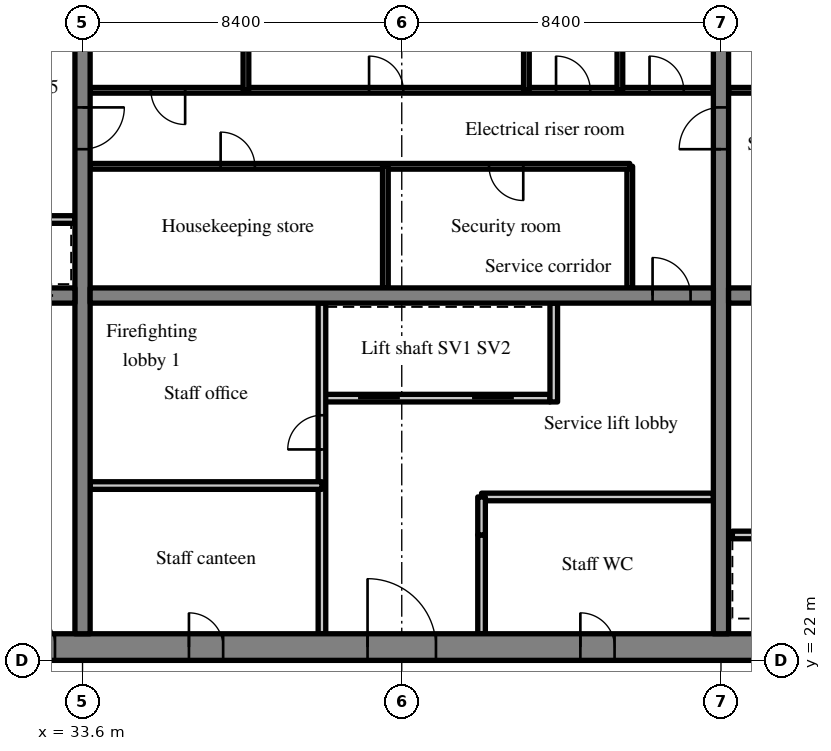
"""IFC4 building model, lengths in metres.
Left out: names, types, materials, properties, quantities, classifications, styles, units other than length and angle.
Written with IfcOpenShell. Run it as: python <this file> out.ifc"""

import sys

from ifc_helpers import new_model, si_unit, direction, frame, frame_2d, origin, place, context, subcontext, project, spatial, rectangle, extrude, source, transform, mapped, element, fill, save


model = new_model("IFC4")
c1 = context("Model", 3, precision=1e-05, world=origin(), true_north=direction((0.0, 1.0)))
c2 = subcontext(c1, "Body", "Model", "MODEL_VIEW")
j1 = project(units=[si_unit("LENGTHUNIT", "METRE"), si_unit("PLANEANGLEUNIT", "RADIAN")], contexts=[c1])
p1 = place(None, origin())
s1 = spatial("IfcSite", under=j1, at=p1, CompositionType="ELEMENT")
p2 = place(p1, origin())
s2 = spatial("IfcBuilding", under=s1, at=p2, CompositionType="ELEMENT")
p3 = place(p2, frame((0.0, 0.0, 178.2)))
s3 = spatial("IfcBuildingStorey", under=s2, at=p3, CompositionType="ELEMENT", Elevation=178.2)
m1 = source(origin(), c2, "Body", "SweptSolid", [
    extrude(rectangle(XDim=50.4, YDim=0.7, at=frame_2d((25.2, 0.0))), origin(), (0.0, 0.0, 1.0), 3.52),
])
p4 = place(p3, frame((25.2, 22.35, 0.0), z_axis=(0.0, 0.0, 1.0), x_axis=(1.0, 0.0, 0.0)))
e1 = element("IfcWall", 1, at=p4, inside=s3, PredefinedType="SHEAR", context=c2, shape_type="MappedRepresentation", body=[
    mapped(m1, transform((0.0, 0.0, 0.0), scale=1.0)),
])
m2 = source(origin(), c2, "Body", "SweptSolid", [
    extrude(rectangle(XDim=1.8, YDim=2.1, at=frame_2d((0.9, 1.05))), frame((0.0, 0.36, 0.0), z_axis=(0.0, -1.0, 0.0), x_axis=(1.0, 0.0, 0.0)), (0.0, 0.0, 1.0), 0.72),
])
p5 = place(p4, frame((15.9, 0.0, 0.0)))
e2 = element("IfcOpeningElement", 2, at=p5, cuts=e1, PredefinedType="OPENING", context=c2, shape_type="MappedRepresentation", body=[
    mapped(m2, transform((0.0, 0.0, 0.0), scale=1.0)),
])
m3 = source(origin(), c2, "Body", "SweptSolid", [
    extrude(rectangle(XDim=0.9, YDim=2.1, at=frame_2d((0.45, 1.05))), frame((0.0, 0.36, 0.0), z_axis=(0.0, -1.0, 0.0), x_axis=(1.0, 0.0, 0.0)), (0.0, 0.0, 1.0), 0.72),
])
p6 = place(p4, frame((11.2, 0.0, 0.0)))
e3 = element("IfcOpeningElement", 3, at=p6, cuts=e1, PredefinedType="OPENING", context=c2, shape_type="MappedRepresentation", body=[
    mapped(m3, transform((0.0, 0.0, 0.0), scale=1.0)),
])
p7 = place(p4, frame((21.5, 0.0, 0.0)))
e4 = element("IfcOpeningElement", 4, at=p7, cuts=e1, PredefinedType="OPENING", context=c2, shape_type="MappedRepresentation", body=[
    mapped(m3, transform((0.0, 0.0, 0.0), scale=1.0)),
])
p8 = place(p4, frame((32.7, 0.0, 0.0)))
e5 = element("IfcOpeningElement", 5, at=p8, cuts=e1, PredefinedType="OPENING", context=c2, shape_type="MappedRepresentation", body=[
    mapped(m2, transform((0.0, 0.0, 0.0), scale=1.0)),
])
m4 = source(origin(), c2, "Body", "SweptSolid", [
    extrude(rectangle(XDim=1.2, YDim=2.1, at=frame_2d((0.6, 1.05))), frame((0.0, 0.36, 0.0), z_axis=(0.0, -1.0, 0.0), x_axis=(1.0, 0.0, 0.0)), (0.0, 0.0, 1.0), 0.72),
])
p9 = place(p4, frame((6.475, 0.0, 0.0)))
e6 = element("IfcOpeningElement", 6, at=p9, cuts=e1, PredefinedType="OPENING", context=c2, shape_type="MappedRepresentation", body=[
    mapped(m4, transform((0.0, 0.0, 0.0), scale=1.0)),
])
p10 = place(p4, frame((47.875, 0.0, 0.0)))
e7 = element("IfcOpeningElement", 7, at=p10, cuts=e1, PredefinedType="OPENING", context=c2, shape_type="MappedRepresentation", body=[
    mapped(m4, transform((0.0, 0.0, 0.0), scale=1.0)),
])
m5 = source(origin(), c2, "Body", "SweptSolid", [
    extrude(rectangle(XDim=18.6, YDim=0.4, at=frame_2d((9.3, 0.0))), origin(), (0.0, 0.0, 1.0), 3.52),
])
p11 = place(p3, frame((33.6, 22.7, 0.0), z_axis=(0.0, 0.0, 1.0), x_axis=(0.0, 1.0, 0.0)))
e8 = element("IfcWall", 8, at=p11, inside=s3, PredefinedType="SHEAR", context=c2, shape_type="MappedRepresentation", body=[
    mapped(m5, transform((0.0, 0.0, 0.0), scale=1.0)),
])
m6 = source(origin(), c2, "Body", "SweptSolid", [
    extrude(rectangle(XDim=1.1, YDim=2.1, at=frame_2d((0.55, 1.05))), frame((0.0, 0.21, 0.0), z_axis=(0.0, -1.0, 0.0), x_axis=(1.0, 0.0, 0.0)), (0.0, 0.0, 1.0), 0.42),
])
p12 = place(p11, frame((12.75, 0.0, 0.0)))
e9 = element("IfcOpeningElement", 9, at=p12, cuts=e8, PredefinedType="OPENING", context=c2, shape_type="MappedRepresentation", body=[
    mapped(m6, transform((0.0, 0.0, 0.0), scale=1.0)),
])
p13 = place(p3, frame((50.4, 22.7, 0.0), z_axis=(0.0, 0.0, 1.0), x_axis=(0.0, 1.0, 0.0)))
e10 = element("IfcWall", 10, at=p13, inside=s3, PredefinedType="SHEAR", context=c2, shape_type="MappedRepresentation", body=[
    mapped(m5, transform((0.0, 0.0, 0.0), scale=1.0)),
])
p14 = place(p13, frame((12.75, 0.0, 0.0)))
e11 = element("IfcOpeningElement", 11, at=p14, cuts=e10, PredefinedType="OPENING", context=c2, shape_type="MappedRepresentation", body=[
    mapped(m6, transform((0.0, 0.0, 0.0), scale=1.0)),
])
m7 = source(origin(), c2, "Body", "SweptSolid", [
    extrude(rectangle(XDim=7.5, YDim=0.4, at=frame_2d((3.75, 0.0))), origin(), (0.0, 0.0, 1.0), 3.52),
])
p15 = place(p3, frame((25.9, 31.6, 0.0), z_axis=(0.0, 0.0, 1.0), x_axis=(1.0, 0.0, 0.0)))
e12 = element("IfcWall", 12, at=p15, inside=s3, PredefinedType="SHEAR", context=c2, shape_type="MappedRepresentation", body=[
    mapped(m7, transform((0.0, 0.0, 0.0), scale=1.0)),
])
p16 = place(p15, frame((5.825, 0.0, 0.0)))
e13 = element("IfcOpeningElement", 13, at=p16, cuts=e12, PredefinedType="OPENING", context=c2, shape_type="MappedRepresentation", body=[
    mapped(m6, transform((0.0, 0.0, 0.0), scale=1.0)),
])
m8 = source(origin(), c2, "Body", "SweptSolid", [
    extrude(rectangle(XDim=16.4, YDim=0.4, at=frame_2d((8.2, 0.0))), origin(), (0.0, 0.0, 1.0), 3.52),
])
p17 = place(p3, frame((33.8, 31.6, 0.0), z_axis=(0.0, 0.0, 1.0), x_axis=(1.0, 0.0, 0.0)))
e14 = element("IfcWall", 14, at=p17, inside=s3, PredefinedType="SHEAR", context=c2, shape_type="MappedRepresentation", body=[
    mapped(m8, transform((0.0, 0.0, 0.0), scale=1.0)),
])
m9 = source(origin(), c2, "Body", "SweptSolid", [
    extrude(rectangle(XDim=1.0, YDim=2.1, at=frame_2d((0.5, 1.05))), frame((0.0, 0.21, 0.0), z_axis=(0.0, -1.0, 0.0), x_axis=(1.0, 0.0, 0.0)), (0.0, 0.0, 1.0), 0.42),
])
p18 = place(p17, frame((14.8, 0.0, 0.0)))
e15 = element("IfcOpeningElement", 15, at=p18, cuts=e14, PredefinedType="OPENING", context=c2, shape_type="MappedRepresentation", body=[
    mapped(m9, transform((0.0, 0.0, 0.0), scale=1.0)),
])
p19 = place(p3, frame((50.6, 31.6, 0.0), z_axis=(0.0, 0.0, 1.0), x_axis=(1.0, 0.0, 0.0)))
e16 = element("IfcWall", 16, at=p19, inside=s3, PredefinedType="SHEAR", context=c2, shape_type="MappedRepresentation", body=[
    mapped(m8, transform((0.0, 0.0, 0.0), scale=1.0)),
])
p20 = place(p19, frame((0.6, 0.0, 0.0)))
e17 = element("IfcOpeningElement", 17, at=p20, cuts=e16, PredefinedType="OPENING", context=c2, shape_type="MappedRepresentation", body=[
    mapped(m9, transform((0.0, 0.0, 0.0), scale=1.0)),
])
m10 = source(origin(), c2, "Body", "SweptSolid", [
    extrude(rectangle(XDim=6.0, YDim=0.2, at=frame_2d((3.0, 0.0))), origin(), (0.0, 0.0, 1.0), 3.52),
])
p21 = place(p3, frame((39.9, 28.9, 0.0), z_axis=(0.0, 0.0, 1.0), x_axis=(1.0, 0.0, 0.0)))
e18 = element("IfcWall", 18, at=p21, inside=s3, PredefinedType="SOLIDWALL", context=c2, shape_type="MappedRepresentation", body=[
    mapped(m10, transform((0.0, 0.0, 0.0), scale=1.0)),
])
m11 = source(origin(), c2, "Body", "SweptSolid", [
    extrude(rectangle(XDim=1.1, YDim=2.1, at=frame_2d((0.55, 1.05))), frame((0.0, 0.11, 0.0), z_axis=(0.0, -1.0, 0.0), x_axis=(1.0, 0.0, 0.0)), (0.0, 0.0, 1.0), 0.22),
])
p22 = place(p21, frame((0.95, 0.0, 0.0)))
e19 = element("IfcOpeningElement", 19, at=p22, cuts=e18, PredefinedType="OPENING", context=c2, shape_type="MappedRepresentation", body=[
    mapped(m11, transform((0.0, 0.0, 0.0), scale=1.0)),
])
p23 = place(p21, frame((3.95, 0.0, 0.0)))
e20 = element("IfcOpeningElement", 20, at=p23, cuts=e18, PredefinedType="OPENING", context=c2, shape_type="MappedRepresentation", body=[
    mapped(m11, transform((0.0, 0.0, 0.0), scale=1.0)),
])
m12 = source(origin(), c2, "Body", "SweptSolid", [
    extrude(rectangle(XDim=8.7, YDim=0.2, at=frame_2d((4.35, 0.0))), origin(), (0.0, 0.0, 1.0), 3.52),
])
p24 = place(p3, frame((39.9, 22.7, 0.0), z_axis=(0.0, 0.0, 1.0), x_axis=(0.0, 1.0, 0.0)))
e21 = element("IfcWall", 21, at=p24, inside=s3, PredefinedType="PARTITIONING", context=c2, shape_type="MappedRepresentation", body=[
    mapped(m12, transform((0.0, 0.0, 0.0), scale=1.0)),
])
m13 = source(origin(), c2, "Body", "SweptSolid", [
    extrude(rectangle(XDim=0.9, YDim=2.1, at=frame_2d((0.45, 1.05))), frame((0.0, 0.11, 0.0), z_axis=(0.0, -1.0, 0.0), x_axis=(1.0, 0.0, 0.0)), (0.0, 0.0, 1.0), 0.22),
])
p25 = place(p24, frame((4.85, 0.0, 0.0)))
e22 = element("IfcOpeningElement", 22, at=p25, cuts=e21, PredefinedType="OPENING", context=c2, shape_type="MappedRepresentation", body=[
    mapped(m13, transform((0.0, 0.0, 0.0), scale=1.0)),
])
m14 = source(origin(), c2, "Body", "SweptSolid", [
    extrude(rectangle(XDim=2.6, YDim=0.2, at=frame_2d((1.3, 0.0))), origin(), (0.0, 0.0, 1.0), 3.52),
])
p26 = place(p3, frame((44.1, 22.7, 0.0), z_axis=(0.0, 0.0, 1.0), x_axis=(0.0, 1.0, 0.0)))
e23 = element("IfcWall", 23, at=p26, inside=s3, PredefinedType="PARTITIONING", context=c2, shape_type="MappedRepresentation", body=[
    mapped(m14, transform((0.0, 0.0, 0.0), scale=1.0)),
])
m15 = source(origin(), c2, "Body", "SweptSolid", [
    extrude(rectangle(XDim=2.6, YDim=0.2, at=frame_2d((1.3, 0.0))), origin(), (0.0, 0.0, 1.0), 3.52),
])
p27 = place(p3, frame((46.0, 28.8, 0.0), z_axis=(0.0, 0.0, 1.0), x_axis=(0.0, 1.0, 0.0)))
e24 = element("IfcWall", 24, at=p27, inside=s3, PredefinedType="SOLIDWALL", context=c2, shape_type="MappedRepresentation", body=[
    mapped(m15, transform((0.0, 0.0, 0.0), scale=1.0)),
])
m16 = source(origin(), c2, "Body", "SweptSolid", [
    extrude(rectangle(XDim=6.1, YDim=0.2, at=frame_2d((3.05, 0.0))), origin(), (0.0, 0.0, 1.0), 3.52),
])
for number, where, z_axis, x_axis in (
    (25, (33.8, 26.6, 0.0), (0.0, 0.0, 1.0), (1.0, 0.0, 0.0)),
    (26, (44.1, 26.3, 0.0), (0.0, 0.0, 1.0), (1.0, 0.0, 0.0)),
):
    element("IfcWall", number, at=place(p3, frame(where, z_axis=z_axis, x_axis=x_axis)), inside=s3, PredefinedType="PARTITIONING", context=c2, shape_type="MappedRepresentation", body=[
        mapped(m16, transform((0.0, 0.0, 0.0), scale=1.0)),
    ])
m17 = source(origin(), c2, "Body", "SweptSolid", [
    extrude(rectangle(XDim=1.0, YDim=0.2, at=frame_2d((0.5, 0.0))), origin(), (0.0, 0.0, 1.0), 3.52),
])
p28 = place(p3, frame((44.1, 25.3, 0.0), z_axis=(0.0, 0.0, 1.0), x_axis=(0.0, 1.0, 0.0)))
e27 = element("IfcWall", 27, at=p28, inside=s3, PredefinedType="PARTITIONING", context=c2, shape_type="MappedRepresentation", body=[
    mapped(m17, transform((0.0, 0.0, 0.0), scale=1.0)),
])
m18 = source(origin(), c2, "Body", "SweptSolid", [
    extrude(rectangle(XDim=3.2, YDim=0.15, at=frame_2d((1.6, 0.0))), origin(), (0.0, 0.0, 1.0), 3.52),
])
p29 = place(p3, frame((48.0, 31.8, 0.0), z_axis=(0.0, 0.0, 1.0), x_axis=(0.0, 1.0, 0.0)))
e28 = element("IfcWall", 28, at=p29, inside=s3, PredefinedType="PARTITIONING", context=c2, shape_type="MappedRepresentation", body=[
    mapped(m18, transform((0.0, 0.0, 0.0), scale=1.0)),
])
m19 = source(origin(), c2, "Body", "SweptSolid", [
    extrude(rectangle(XDim=14.2, YDim=0.15, at=frame_2d((7.1, 0.0))), origin(), (0.0, 0.0, 1.0), 3.52),
])
p30 = place(p3, frame((33.8, 35.0, 0.0), z_axis=(0.0, 0.0, 1.0), x_axis=(1.0, 0.0, 0.0)))
e29 = element("IfcWall", 29, at=p30, inside=s3, PredefinedType="PARTITIONING", context=c2, shape_type="MappedRepresentation", body=[
    mapped(m19, transform((0.0, 0.0, 0.0), scale=1.0)),
])
m20 = source(origin(), c2, "Body", "SweptSolid", [
    extrude(rectangle(XDim=0.9, YDim=2.1, at=frame_2d((0.45, 1.05))), frame((0.0, 0.085, 0.0), z_axis=(0.0, -1.0, 0.0), x_axis=(1.0, 0.0, 0.0)), (0.0, 0.0, 1.0), 0.17),
])
p31 = place(p30, frame((3.434, 0.0, 0.0)))
e30 = element("IfcOpeningElement", 30, at=p31, cuts=e29, PredefinedType="OPENING", context=c2, shape_type="MappedRepresentation", body=[
    mapped(m20, transform((0.0, 0.0, 0.0), scale=1.0)),
])
p32 = place(p30, frame((10.497, 0.0, 0.0)))
e31 = element("IfcOpeningElement", 31, at=p32, cuts=e29, PredefinedType="OPENING", context=c2, shape_type="MappedRepresentation", body=[
    mapped(m20, transform((0.0, 0.0, 0.0), scale=1.0)),
])
m21 = source(origin(), c2, "Body", "SweptSolid", [
    extrude(rectangle(XDim=16.4, YDim=0.15, at=frame_2d((8.2, 0.0))), origin(), (0.0, 0.0, 1.0), 3.52),
])
p33 = place(p3, frame((33.8, 37.0, 0.0), z_axis=(0.0, 0.0, 1.0), x_axis=(1.0, 0.0, 0.0)))
e32 = element("IfcWall", 32, at=p33, inside=s3, PredefinedType="PARTITIONING", context=c2, shape_type="MappedRepresentation", body=[
    mapped(m21, transform((0.0, 0.0, 0.0), scale=1.0)),
])
p34 = place(p33, frame((1.6, 0.0, 0.0)))
e33 = element("IfcOpeningElement", 33, at=p34, cuts=e32, PredefinedType="OPENING", context=c2, shape_type="MappedRepresentation", body=[
    mapped(m20, transform((0.0, 0.0, 0.0), scale=1.0)),
])
p35 = place(p33, frame((7.34, 0.0, 0.0)))
e34 = element("IfcOpeningElement", 34, at=p35, cuts=e32, PredefinedType="OPENING", context=c2, shape_type="MappedRepresentation", body=[
    mapped(m20, transform((0.0, 0.0, 0.0), scale=1.0)),
])
p36 = place(p33, frame((12.26, 0.0, 0.0)))
e35 = element("IfcOpeningElement", 35, at=p36, cuts=e32, PredefinedType="OPENING", context=c2, shape_type="MappedRepresentation", body=[
    mapped(m20, transform((0.0, 0.0, 0.0), scale=1.0)),
])
p37 = place(p33, frame((14.72, 0.0, 0.0)))
e36 = element("IfcOpeningElement", 36, at=p37, cuts=e32, PredefinedType="OPENING", context=c2, shape_type="MappedRepresentation", body=[
    mapped(m20, transform((0.0, 0.0, 0.0), scale=1.0)),
])
p38 = place(p3, frame((41.569, 31.8, 0.0), z_axis=(0.0, 0.0, 1.0), x_axis=(0.0, 1.0, 0.0)))
e37 = element("IfcWall", 37, at=p38, inside=s3, PredefinedType="PARTITIONING", context=c2, shape_type="MappedRepresentation", body=[
    mapped(m18, transform((0.0, 0.0, 0.0), scale=1.0)),
])
m22 = source(origin(), c2, "Body", "SweptSolid", [
    extrude(rectangle(XDim=4.3, YDim=0.15, at=frame_2d((2.15, 0.0))), origin(), (0.0, 0.0, 1.0), 3.52),
])
for number, where, z_axis, x_axis in (
    (38, (37.9, 37.0, 0.0), (0.0, 0.0, 1.0), (0.0, 1.0, 0.0)),
    (39, (45.28, 37.0, 0.0), (0.0, 0.0, 1.0), (0.0, 1.0, 0.0)),
    (40, (47.74, 37.0, 0.0), (0.0, 0.0, 1.0), (0.0, 1.0, 0.0)),
):
    element("IfcWall", number, at=place(p3, frame(where, z_axis=z_axis, x_axis=x_axis)), inside=s3, PredefinedType="PARTITIONING", context=c2, shape_type="MappedRepresentation", body=[
        mapped(m22, transform((0.0, 0.0, 0.0), scale=1.0)),
    ])
p39 = place(p3, frame((56.7, 25.3, 0.0), z_axis=(0.0, 0.0, 1.0), x_axis=(-1.0, 0.0, 0.0)))
e41 = element("IfcWall", 41, at=p39, inside=s3, PredefinedType="SOLIDWALL", context=c2, shape_type="MappedRepresentation", body=[
    mapped(m10, transform((0.0, 0.0, 0.0), scale=1.0)),
])
p40 = place(p39, frame((0.95, 0.0, 0.0)))
e42 = element("IfcOpeningElement", 42, at=p40, cuts=e41, PredefinedType="OPENING", context=c2, shape_type="MappedRepresentation", body=[
    mapped(m11, transform((0.0, 0.0, 0.0), scale=1.0)),
])
p41 = place(p39, frame((3.95, 0.0, 0.0)))
e43 = element("IfcOpeningElement", 43, at=p41, cuts=e41, PredefinedType="OPENING", context=c2, shape_type="MappedRepresentation", body=[
    mapped(m11, transform((0.0, 0.0, 0.0), scale=1.0)),
])
p42 = place(p3, frame((67.0, 37.0, 0.0), z_axis=(0.0, 0.0, 1.0), x_axis=(-1.0, 0.0, 0.0)))
e44 = element("IfcWall", 44, at=p42, inside=s3, PredefinedType="PARTITIONING", context=c2, shape_type="MappedRepresentation", body=[
    mapped(m21, transform((0.0, 0.0, 0.0), scale=1.0)),
])
p43 = place(p42, frame((3.24, 0.0, 0.0)))
e45 = element("IfcOpeningElement", 45, at=p43, cuts=e44, PredefinedType="OPENING", context=c2, shape_type="MappedRepresentation", body=[
    mapped(m20, transform((0.0, 0.0, 0.0), scale=1.0)),
])
p44 = place(p42, frame((8.16, 0.0, 0.0)))
e46 = element("IfcOpeningElement", 46, at=p44, cuts=e44, PredefinedType="OPENING", context=c2, shape_type="MappedRepresentation", body=[
    mapped(m20, transform((0.0, 0.0, 0.0), scale=1.0)),
])
p45 = place(p42, frame((11.44, 0.0, 0.0)))
e47 = element("IfcOpeningElement", 47, at=p45, cuts=e44, PredefinedType="OPENING", context=c2, shape_type="MappedRepresentation", body=[
    mapped(m20, transform((0.0, 0.0, 0.0), scale=1.0)),
])
p46 = place(p42, frame((14.72, 0.0, 0.0)))
e48 = element("IfcOpeningElement", 48, at=p46, cuts=e44, PredefinedType="OPENING", context=c2, shape_type="MappedRepresentation", body=[
    mapped(m20, transform((0.0, 0.0, 0.0), scale=1.0)),
])
m23 = source(origin(), c2, "Body", "SweptSolid", [
    extrude(rectangle(XDim=2.25, YDim=0.2, at=frame_2d((1.125, 0.0))), origin(), (0.0, 0.0, 1.0), 3.52),
])
p47 = place(p3, frame((31.15, 33.6, 0.0), z_axis=(0.0, 0.0, 1.0), x_axis=(1.0, 0.0, 0.0)))
e49 = element("IfcWall", 49, at=p47, inside=s3, PredefinedType="SOLIDWALL", context=c2, shape_type="MappedRepresentation", body=[
    mapped(m23, transform((0.0, 0.0, 0.0), scale=1.0)),
])
m24 = source(origin(), c2, "Body", "SweptSolid", [
    extrude(rectangle(XDim=1.8, YDim=2.1, at=frame_2d((0.9, 1.05))), frame((0.0, 0.275, 0.0), z_axis=(0.0, -1.0, 0.0), x_axis=(1.0, 0.0, 0.0)), (0.0, 0.0, 1.0), 0.05),
])
p48 = place(p5, origin())
e50 = element("IfcDoor", 50, at=p48, inside=s3, OperationType="DOUBLE_DOOR_SINGLE_SWING", PredefinedType="DOOR", context=c2, shape_type="MappedRepresentation", body=[
    mapped(m24, transform((0.0, 0.0, 0.0), scale=1.0)),
])
fill(e2, e50)
m25 = source(origin(), c2, "Body", "SweptSolid", [
    extrude(rectangle(XDim=1.0, YDim=2.1, at=frame_2d((0.5, 1.05))), frame((0.0, 0.025, 0.0), z_axis=(0.0, -1.0, 0.0), x_axis=(1.0, 0.0, 0.0)), (0.0, 0.0, 1.0), 0.05),
])
p49 = place(p18, origin())
e51 = element("IfcDoor", 51, at=p49, inside=s3, OperationType="SINGLE_SWING_LEFT", PredefinedType="DOOR", context=c2, shape_type="MappedRepresentation", body=[
    mapped(m25, transform((0.0, 0.0, 0.0), scale=1.0)),
])
fill(e15, e51)
m26 = source(origin(), c2, "Body", "SweptSolid", [
    extrude(rectangle(XDim=1.1, YDim=2.1, at=frame_2d((0.55, 1.05))), frame((0.0, 0.025, 0.0), z_axis=(0.0, -1.0, 0.0), x_axis=(1.0, 0.0, 0.0)), (0.0, 0.0, 1.0), 0.05),
])
p50 = place(p22, origin())
e52 = element("IfcDoor", 52, at=p50, inside=s3, OperationType="SLIDING_TO_LEFT", PredefinedType="DOOR", context=c2, shape_type="MappedRepresentation", body=[
    mapped(m26, transform((0.0, 0.0, 0.0), scale=1.0)),
])
fill(e19, e52)
p51 = place(p23, origin())
e53 = element("IfcDoor", 53, at=p51, inside=s3, OperationType="SLIDING_TO_RIGHT", PredefinedType="DOOR", context=c2, shape_type="MappedRepresentation", body=[
    mapped(m26, transform((0.0, 0.0, 0.0), scale=1.0)),
])
fill(e20, e53)
m27 = source(origin(), c2, "Body", "SweptSolid", [
    extrude(rectangle(XDim=0.9, YDim=2.1, at=frame_2d((0.45, 1.05))), frame((0.0, 0.275, 0.0), z_axis=(0.0, -1.0, 0.0), x_axis=(1.0, 0.0, 0.0)), (0.0, 0.0, 1.0), 0.05),
])
p52 = place(p6, origin())
e54 = element("IfcDoor", 54, at=p52, inside=s3, OperationType="SINGLE_SWING_LEFT", PredefinedType="DOOR", context=c2, shape_type="MappedRepresentation", body=[
    mapped(m27, transform((0.0, 0.0, 0.0), scale=1.0)),
])
fill(e3, e54)
m28 = source(origin(), c2, "Body", "SweptSolid", [
    extrude(rectangle(XDim=0.9, YDim=2.1, at=frame_2d((0.45, 1.05))), frame((0.0, 0.025, 0.0), z_axis=(0.0, -1.0, 0.0), x_axis=(1.0, 0.0, 0.0)), (0.0, 0.0, 1.0), 0.05),
])
p53 = place(p25, origin())
e55 = element("IfcDoor", 55, at=p53, inside=s3, OperationType="SINGLE_SWING_LEFT", PredefinedType="DOOR", context=c2, shape_type="MappedRepresentation", body=[
    mapped(m28, transform((0.0, 0.0, 0.0), scale=1.0)),
])
fill(e22, e55)
p54 = place(p7, origin())
e56 = element("IfcDoor", 56, at=p54, inside=s3, OperationType="SINGLE_SWING_LEFT", PredefinedType="DOOR", context=c2, shape_type="MappedRepresentation", body=[
    mapped(m27, transform((0.0, 0.0, 0.0), scale=1.0)),
])
fill(e4, e56)
p55 = place(p31, origin())
e57 = element("IfcDoor", 57, at=p55, inside=s3, OperationType="SINGLE_SWING_LEFT", PredefinedType="DOOR", context=c2, shape_type="MappedRepresentation", body=[
    mapped(m28, transform((0.0, 0.0, 0.0), scale=1.0)),
])
fill(e30, e57)
p56 = place(p32, origin())
e58 = element("IfcDoor", 58, at=p56, inside=s3, OperationType="SINGLE_SWING_RIGHT", PredefinedType="DOOR", context=c2, shape_type="MappedRepresentation", body=[
    mapped(m28, transform((0.0, 0.0, 0.0), scale=1.0)),
])
fill(e31, e58)
p57 = place(p34, origin())
e59 = element("IfcDoor", 59, at=p57, inside=s3, OperationType="SINGLE_SWING_RIGHT", PredefinedType="DOOR", context=c2, shape_type="MappedRepresentation", body=[
    mapped(m28, transform((0.0, 0.0, 0.0), scale=1.0)),
])
fill(e33, e59)
p58 = place(p35, origin())
e60 = element("IfcDoor", 60, at=p58, inside=s3, OperationType="SINGLE_SWING_LEFT", PredefinedType="DOOR", context=c2, shape_type="MappedRepresentation", body=[
    mapped(m28, transform((0.0, 0.0, 0.0), scale=1.0)),
])
fill(e34, e60)
p59 = place(p36, origin())
e61 = element("IfcDoor", 61, at=p59, inside=s3, OperationType="SINGLE_SWING_LEFT", PredefinedType="DOOR", context=c2, shape_type="MappedRepresentation", body=[
    mapped(m28, transform((0.0, 0.0, 0.0), scale=1.0)),
])
fill(e35, e61)
p60 = place(p37, origin())
e62 = element("IfcDoor", 62, at=p60, inside=s3, OperationType="SINGLE_SWING_LEFT", PredefinedType="DOOR", context=c2, shape_type="MappedRepresentation", body=[
    mapped(m28, transform((0.0, 0.0, 0.0), scale=1.0)),
])
fill(e36, e62)
m29 = source(origin(), c2, "Body", "SweptSolid", [
    extrude(rectangle(XDim=1.2, YDim=2.1, at=frame_2d((0.6, 1.05))), frame((0.0, 0.275, 0.0), z_axis=(0.0, -1.0, 0.0), x_axis=(1.0, 0.0, 0.0)), (0.0, 0.0, 1.0), 0.05),
])
p61 = place(p9, origin())
e63 = element("IfcDoor", 63, at=p61, inside=s3, OperationType="SINGLE_SWING_LEFT", PredefinedType="DOOR", context=c2, shape_type="MappedRepresentation", body=[
    mapped(m29, transform((0.0, 0.0, 0.0), scale=1.0)),
])
fill(e6, e63)
p62 = place(p16, origin())
e64 = element("IfcDoor", 64, at=p62, inside=s3, OperationType="SLIDING_TO_LEFT", PredefinedType="DOOR", context=c2, shape_type="MappedRepresentation", body=[
    mapped(m26, transform((0.0, 0.0, 0.0), scale=1.0)),
])
fill(e13, e64)
p63 = place(p12, origin())
e65 = element("IfcDoor", 65, at=p63, inside=s3, OperationType="SINGLE_SWING_RIGHT", PredefinedType="DOOR", context=c2, shape_type="MappedRepresentation", body=[
    mapped(m26, transform((0.0, 0.0, 0.0), scale=1.0)),
])
fill(e9, e65)
p64 = place(p14, origin())
e66 = element("IfcDoor", 66, at=p64, inside=s3, OperationType="SINGLE_SWING_LEFT", PredefinedType="DOOR", context=c2, shape_type="MappedRepresentation", body=[
    mapped(m26, transform((0.0, 0.0, 0.0), scale=1.0)),
])
fill(e11, e66)
save(model, sys.argv[1])
